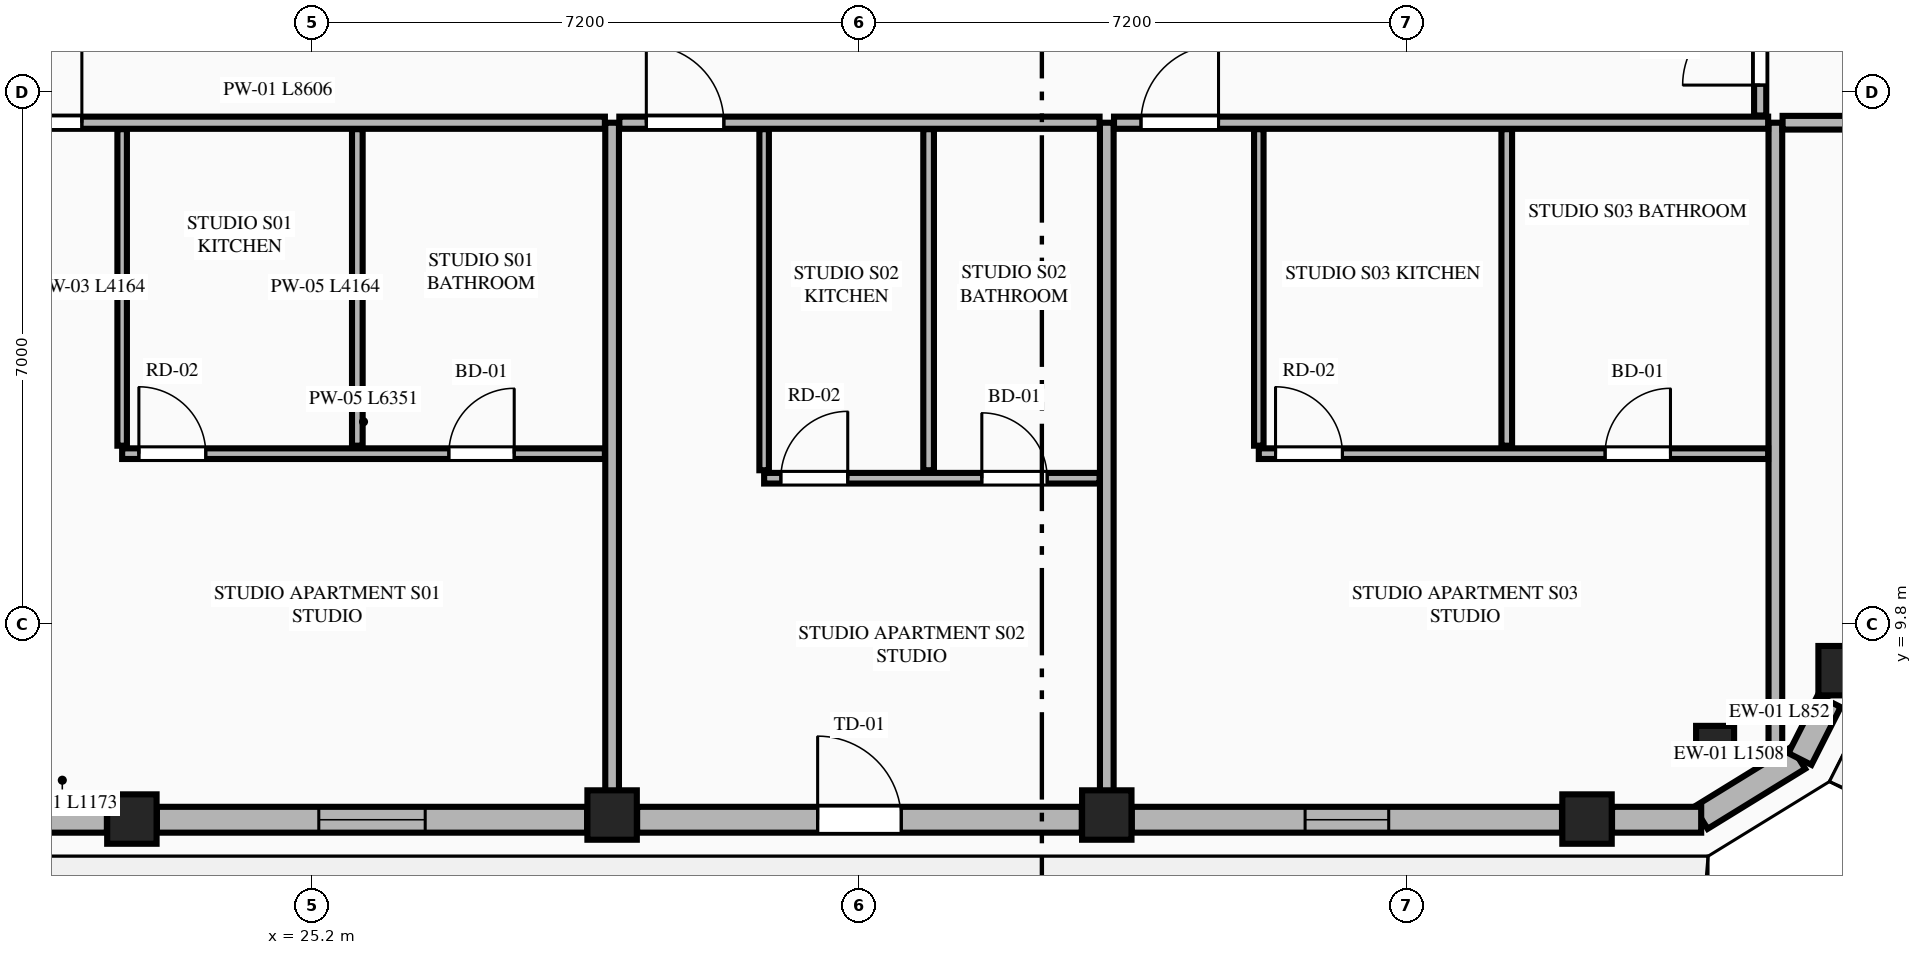
"""IFC4 building model, lengths in metres.
Left out: names, types, materials, properties, quantities, classifications, styles, units other than length and angle.
Written with IfcOpenShell. Run it as: python <this file> out.ifc"""

import sys

from ifc_helpers import new_model, si_unit, direction, frame, frame_2d, origin, origin_2d, place, context, subcontext, project, spatial, rectangle, extrude, element, fill, save


model = new_model("IFC4")
c1 = context("Model", 3, precision=1e-05, world=origin(), true_north=direction((0.0, 1.0)))
c2 = subcontext(c1, "Body", "Model", "MODEL_VIEW")
j1 = project(units=[si_unit("LENGTHUNIT", "METRE"), si_unit("PLANEANGLEUNIT", "RADIAN")], contexts=[c1])
p1 = place(None, origin())
s1 = spatial("IfcSite", under=j1, at=p1, CompositionType="ELEMENT")
p2 = place(p1, origin())
s2 = spatial("IfcBuilding", under=s1, at=p2, CompositionType="ELEMENT")
p3 = place(p2, frame((0.0, 0.0, 270.8)))
s3 = spatial("IfcBuildingStorey", under=s2, at=p3, CompositionType="ELEMENT", Elevation=270.8)
for number, where, z_axis, x_axis in (
    (1, (22.828, 7.239, 0.0), (0.0, 0.0, 1.0), (1.0, 0.0, 0.0)),
    (2, (29.146, 7.292, 0.0), (0.0, 0.0, 1.0), (1.0, 0.0, 0.0)),
    (3, (35.654, 7.292, 0.0), (0.0, 0.0, 1.0), (1.0, 0.0, 0.0)),
    (4, (41.972, 7.239, 0.0), (0.0, 0.0, 1.0), (1.0, 0.0, 0.0)),
    (5, (45.341, 9.191, 0.0), (0.0, 0.0, 1.0), (1.0, 0.0, 0.0)),
):
    element("IfcColumn", number, at=place(p3, frame(where, z_axis=z_axis, x_axis=x_axis)), inside=s3, PredefinedType="COLUMN", context=c2, shape_type="SweptSolid", body=[
        extrude(rectangle(XDim=0.65, YDim=0.65, at=origin_2d()), origin(), (0.0, 0.0, 1.0), 3.65),
    ])
p4 = place(p3, frame((43.657, 8.215, 0.0), z_axis=(0.0, 0.0, 1.0), x_axis=(0.865256437757, 0.501329529272, 0.0)))
e6 = element("IfcColumn", 6, at=p4, inside=s3, PredefinedType="PILASTER", context=c2, shape_type="SweptSolid", body=[
    extrude(rectangle(XDim=0.5, YDim=0.35, at=origin_2d()), origin(), (0.0, 0.0, 1.0), 3.65),
])
p5 = place(p3, frame((43.469, 7.255, 0.0), z_axis=(0.0, 0.0, 1.0), x_axis=(0.851680557619, 0.52406128246, 0.0)))
e7 = element("IfcWall", 7, at=p5, inside=s3, PredefinedType="STANDARD", context=c2, shape_type="SweptSolid", body=[
    extrude(rectangle(XDim=1.508, YDim=0.34, at=frame_2d((0.754, 0.0))), origin(), (0.0, 0.0, 1.0), 3.45),
])
p6 = place(p3, frame((21.326, 7.23, 0.0), z_axis=(0.0, 0.0, 1.0), x_axis=(1.0, 0.0, 0.0)))
e8 = element("IfcWall", 8, at=p6, inside=s3, PredefinedType="STANDARD", context=c2, shape_type="SweptSolid", body=[
    extrude(rectangle(XDim=1.173, YDim=0.34, at=frame_2d((0.586, 0.0))), origin(), (0.0, 0.0, 1.0), 3.45),
])
p7 = place(p3, frame((23.157, 7.23, 0.0), z_axis=(0.0, 0.0, 1.0), x_axis=(1.0, 0.0, 0.0)))
e9 = element("IfcWall", 9, at=p7, inside=s3, PredefinedType="STANDARD", context=c2, shape_type="SweptSolid", body=[
    extrude(rectangle(XDim=5.66, YDim=0.34, at=frame_2d((2.83, 0.0))), origin(), (0.0, 0.0, 1.0), 2.983),
])
p8 = place(p7, frame((2.13, 0.0, 0.75)))
e10 = element("IfcOpeningElement", 10, at=p8, cuts=e9, PredefinedType="OPENING", context=c2, shape_type="SweptSolid", body=[
    extrude(rectangle(XDim=1.4, YDim=2.05, at=frame_2d((0.7, 1.025))), frame((0.0, 0.18, 0.0), z_axis=(0.0, -1.0, 0.0), x_axis=(1.0, 0.0, 0.0)), (0.0, 0.0, 1.0), 0.36),
])
p9 = place(p3, frame((29.475, 7.23, 0.0), z_axis=(0.0, 0.0, 1.0), x_axis=(1.0, 0.0, 0.0)))
e11 = element("IfcWall", 11, at=p9, inside=s3, PredefinedType="STANDARD", context=c2, shape_type="SweptSolid", body=[
    extrude(rectangle(XDim=5.85, YDim=0.34, at=frame_2d((2.925, 0.0))), origin(), (0.0, 0.0, 1.0), 2.983),
])
p10 = place(p9, frame((2.375, 0.0, 0.0)))
e12 = element("IfcOpeningElement", 12, at=p10, cuts=e11, PredefinedType="OPENING", context=c2, shape_type="SweptSolid", body=[
    extrude(rectangle(XDim=1.1, YDim=2.25, at=frame_2d((0.55, 1.125))), frame((0.0, 0.18, 0.0), z_axis=(0.0, -1.0, 0.0), x_axis=(1.0, 0.0, 0.0)), (0.0, 0.0, 1.0), 0.36),
])
p11 = place(p3, frame((35.983, 7.23, 0.0), z_axis=(0.0, 0.0, 1.0), x_axis=(1.0, 0.0, 0.0)))
e13 = element("IfcWall", 13, at=p11, inside=s3, PredefinedType="STANDARD", context=c2, shape_type="SweptSolid", body=[
    extrude(rectangle(XDim=5.66, YDim=0.34, at=frame_2d((2.83, 0.0))), origin(), (0.0, 0.0, 1.0), 2.983),
])
p12 = place(p11, frame((2.28, 0.0, 0.75)))
e14 = element("IfcOpeningElement", 14, at=p12, cuts=e13, PredefinedType="OPENING", context=c2, shape_type="SweptSolid", body=[
    extrude(rectangle(XDim=1.1, YDim=2.0, at=frame_2d((0.55, 1.0))), frame((0.0, 0.18, 0.0), z_axis=(0.0, -1.0, 0.0), x_axis=(1.0, 0.0, 0.0)), (0.0, 0.0, 1.0), 0.36),
])
p13 = place(p3, frame((42.301, 7.23, 0.0), z_axis=(0.0, 0.0, 1.0), x_axis=(1.0, 0.0, 0.0)))
e15 = element("IfcWall", 15, at=p13, inside=s3, PredefinedType="STANDARD", context=c2, shape_type="SweptSolid", body=[
    extrude(rectangle(XDim=1.173, YDim=0.34, at=frame_2d((0.586, 0.0))), origin(), (0.0, 0.0, 1.0), 3.45),
])
p14 = place(p3, frame((44.773, 8.029, 0.0), z_axis=(0.0, 0.0, 1.0), x_axis=(0.451907025977, 0.8920650424, 0.0)))
e16 = element("IfcWall", 16, at=p14, inside=s3, PredefinedType="STANDARD", context=c2, shape_type="SweptSolid", body=[
    extrude(rectangle(XDim=0.852, YDim=0.34, at=frame_2d((0.426, 0.0))), origin(), (0.0, 0.0, 1.0), 3.45),
])
for number, where, z_axis, x_axis in (
    (17, (29.146, 7.405, 0.0), (0.0, 0.0, 1.0), (0.0, 1.0, 0.0)),
    (18, (35.654, 7.405, 0.0), (0.0, 0.0, 1.0), (0.0, 1.0, 0.0)),
):
    element("IfcWall", number, at=place(p3, frame(where, z_axis=z_axis, x_axis=x_axis)), inside=s3, PredefinedType="PARTITIONING", context=c2, shape_type="SweptSolid", body=[
        extrude(rectangle(XDim=8.995, YDim=0.18, at=frame_2d((4.498, 0.0))), origin(), (0.0, 0.0, 1.0), 2.907),
    ])
p15 = place(p3, frame((44.45, 8.119, 0.0), z_axis=(0.0, 0.0, 1.0), x_axis=(0.0, 1.0, 0.0)))
e19 = element("IfcWall", 19, at=p15, inside=s3, PredefinedType="PARTITIONING", context=c2, shape_type="SweptSolid", body=[
    extrude(rectangle(XDim=8.281, YDim=0.18, at=frame_2d((4.141, 0.0))), origin(), (0.0, 0.0, 1.0), 3.45),
])
p16 = place(p3, frame((20.445, 16.4, 0.0), z_axis=(0.0, 0.0, 1.0), x_axis=(1.0, 0.0, 0.0)))
e20 = element("IfcWall", 20, at=p16, inside=s3, PredefinedType="PARTITIONING", context=c2, shape_type="SweptSolid", body=[
    extrude(rectangle(XDim=8.606, YDim=0.16, at=frame_2d((4.303, 0.0))), origin(), (0.0, 0.0, 1.0), 3.45),
])
p17 = place(p16, frame((0.705, 0.0, 0.0)))
e21 = element("IfcOpeningElement", 21, at=p17, cuts=e20, PredefinedType="OPENING", context=c2, shape_type="SweptSolid", body=[
    extrude(rectangle(XDim=1.02, YDim=2.25, at=frame_2d((0.51, 1.125))), frame((0.0, 0.09, 0.0), z_axis=(0.0, -1.0, 0.0), x_axis=(1.0, 0.0, 0.0)), (0.0, 0.0, 1.0), 0.18),
])
p18 = place(p3, frame((22.7, 12.151, 0.0), z_axis=(0.0, 0.0, 1.0), x_axis=(0.0, 1.0, 0.0)))
e22 = element("IfcWall", 22, at=p18, inside=s3, PredefinedType="PARTITIONING", context=c2, shape_type="SweptSolid", body=[
    extrude(rectangle(XDim=4.164, YDim=0.125, at=frame_2d((2.082, 0.0))), origin(), (0.0, 0.0, 1.0), 2.907),
])
p19 = place(p3, frame((22.7, 12.046, 0.0), z_axis=(0.0, 0.0, 1.0), x_axis=(1.0, 0.0, 0.0)))
e23 = element("IfcWall", 23, at=p19, inside=s3, PredefinedType="PLUMBINGWALL", context=c2, shape_type="SweptSolid", body=[
    extrude(rectangle(XDim=6.351, YDim=0.14, at=frame_2d((3.176, 0.0))), origin(), (0.0, 0.0, 1.0), 3.45),
])
p20 = place(p19, frame((4.298, 0.0, 0.0)))
e24 = element("IfcOpeningElement", 24, at=p20, cuts=e23, PredefinedType="OPENING", context=c2, shape_type="SweptSolid", body=[
    extrude(rectangle(XDim=0.86, YDim=2.1, at=frame_2d((0.43, 1.05))), frame((0.0, 0.08, 0.0), z_axis=(0.0, -1.0, 0.0), x_axis=(1.0, 0.0, 0.0)), (0.0, 0.0, 1.0), 0.16),
])
p21 = place(p19, frame((0.22, 0.0, 0.0)))
e25 = element("IfcOpeningElement", 25, at=p21, cuts=e23, PredefinedType="OPENING", context=c2, shape_type="SweptSolid", body=[
    extrude(rectangle(XDim=0.88, YDim=2.15, at=frame_2d((0.44, 1.075))), frame((0.0, 0.08, 0.0), z_axis=(0.0, -1.0, 0.0), x_axis=(1.0, 0.0, 0.0)), (0.0, 0.0, 1.0), 0.16),
])
p22 = place(p3, frame((25.794, 12.151, 0.0), z_axis=(0.0, 0.0, 1.0), x_axis=(0.0, 1.0, 0.0)))
e26 = element("IfcWall", 26, at=p22, inside=s3, PredefinedType="PLUMBINGWALL", context=c2, shape_type="SweptSolid", body=[
    extrude(rectangle(XDim=4.164, YDim=0.14, at=frame_2d((2.082, 0.0))), origin(), (0.0, 0.0, 1.0), 3.45),
])
p23 = place(p3, frame((29.241, 16.4, 0.0), z_axis=(0.0, 0.0, 1.0), x_axis=(1.0, 0.0, 0.0)))
e27 = element("IfcWall", 27, at=p23, inside=s3, PredefinedType="PARTITIONING", context=c2, shape_type="SweptSolid", body=[
    extrude(rectangle(XDim=6.318, YDim=0.16, at=frame_2d((3.159, 0.0))), origin(), (0.0, 0.0, 1.0), 3.45),
])
p24 = place(p23, frame((0.355, 0.0, 0.0)))
e28 = element("IfcOpeningElement", 28, at=p24, cuts=e27, PredefinedType="OPENING", context=c2, shape_type="SweptSolid", body=[
    extrude(rectangle(XDim=1.02, YDim=2.25, at=frame_2d((0.51, 1.125))), frame((0.0, 0.09, 0.0), z_axis=(0.0, -1.0, 0.0), x_axis=(1.0, 0.0, 0.0)), (0.0, 0.0, 1.0), 0.18),
])
p25 = place(p3, frame((31.146, 11.828, 0.0), z_axis=(0.0, 0.0, 1.0), x_axis=(0.0, 1.0, 0.0)))
e29 = element("IfcWall", 29, at=p25, inside=s3, PredefinedType="PARTITIONING", context=c2, shape_type="SweptSolid", body=[
    extrude(rectangle(XDim=4.487, YDim=0.125, at=frame_2d((2.244, 0.0))), origin(), (0.0, 0.0, 1.0), 3.45),
])
p26 = place(p3, frame((31.146, 11.723, 0.0), z_axis=(0.0, 0.0, 1.0), x_axis=(1.0, 0.0, 0.0)))
e30 = element("IfcWall", 30, at=p26, inside=s3, PredefinedType="PLUMBINGWALL", context=c2, shape_type="SweptSolid", body=[
    extrude(rectangle(XDim=4.413, YDim=0.14, at=frame_2d((2.207, 0.0))), origin(), (0.0, 0.0, 1.0), 3.45),
])
p27 = place(p26, frame((2.864, 0.0, 0.0)))
e31 = element("IfcOpeningElement", 31, at=p27, cuts=e30, PredefinedType="OPENING", context=c2, shape_type="SweptSolid", body=[
    extrude(rectangle(XDim=0.86, YDim=2.1, at=frame_2d((0.43, 1.05))), frame((0.0, 0.08, 0.0), z_axis=(0.0, -1.0, 0.0), x_axis=(1.0, 0.0, 0.0)), (0.0, 0.0, 1.0), 0.16),
])
p28 = place(p26, frame((0.22, 0.0, 0.0)))
e32 = element("IfcOpeningElement", 32, at=p28, cuts=e30, PredefinedType="OPENING", context=c2, shape_type="SweptSolid", body=[
    extrude(rectangle(XDim=0.88, YDim=2.15, at=frame_2d((0.44, 1.075))), frame((0.0, 0.08, 0.0), z_axis=(0.0, -1.0, 0.0), x_axis=(1.0, 0.0, 0.0)), (0.0, 0.0, 1.0), 0.16),
])
p29 = place(p3, frame((33.31, 11.828, 0.0), z_axis=(0.0, 0.0, 1.0), x_axis=(0.0, 1.0, 0.0)))
e33 = element("IfcWall", 33, at=p29, inside=s3, PredefinedType="PLUMBINGWALL", context=c2, shape_type="SweptSolid", body=[
    extrude(rectangle(XDim=4.487, YDim=0.14, at=frame_2d((2.244, 0.0))), origin(), (0.0, 0.0, 1.0), 3.45),
])
p30 = place(p3, frame((35.749, 16.4, 0.0), z_axis=(0.0, 0.0, 1.0), x_axis=(1.0, 0.0, 0.0)))
e34 = element("IfcWall", 34, at=p30, inside=s3, PredefinedType="PARTITIONING", context=c2, shape_type="SweptSolid", body=[
    extrude(rectangle(XDim=8.606, YDim=0.16, at=frame_2d((4.303, 0.0))), origin(), (0.0, 0.0, 1.0), 3.45),
])
p31 = place(p30, frame((0.355, 0.0, 0.0)))
e35 = element("IfcOpeningElement", 35, at=p31, cuts=e34, PredefinedType="OPENING", context=c2, shape_type="SweptSolid", body=[
    extrude(rectangle(XDim=1.02, YDim=2.25, at=frame_2d((0.51, 1.125))), frame((0.0, 0.09, 0.0), z_axis=(0.0, -1.0, 0.0), x_axis=(1.0, 0.0, 0.0)), (0.0, 0.0, 1.0), 0.18),
])
p32 = place(p3, frame((37.654, 12.151, 0.0), z_axis=(0.0, 0.0, 1.0), x_axis=(0.0, 1.0, 0.0)))
e36 = element("IfcWall", 36, at=p32, inside=s3, PredefinedType="PARTITIONING", context=c2, shape_type="SweptSolid", body=[
    extrude(rectangle(XDim=4.164, YDim=0.125, at=frame_2d((2.082, 0.0))), origin(), (0.0, 0.0, 1.0), 3.45),
])
p33 = place(p3, frame((37.654, 12.046, 0.0), z_axis=(0.0, 0.0, 1.0), x_axis=(1.0, 0.0, 0.0)))
e37 = element("IfcWall", 37, at=p33, inside=s3, PredefinedType="PLUMBINGWALL", context=c2, shape_type="SweptSolid", body=[
    extrude(rectangle(XDim=6.701, YDim=0.14, at=frame_2d((3.351, 0.0))), origin(), (0.0, 0.0, 1.0), 3.45),
])
p34 = place(p33, frame((4.556, 0.0, 0.0)))
e38 = element("IfcOpeningElement", 38, at=p34, cuts=e37, PredefinedType="OPENING", context=c2, shape_type="SweptSolid", body=[
    extrude(rectangle(XDim=0.86, YDim=2.1, at=frame_2d((0.43, 1.05))), frame((0.0, 0.08, 0.0), z_axis=(0.0, -1.0, 0.0), x_axis=(1.0, 0.0, 0.0)), (0.0, 0.0, 1.0), 0.16),
])
p35 = place(p33, frame((0.22, 0.0, 0.0)))
e39 = element("IfcOpeningElement", 39, at=p35, cuts=e37, PredefinedType="OPENING", context=c2, shape_type="SweptSolid", body=[
    extrude(rectangle(XDim=0.88, YDim=2.15, at=frame_2d((0.44, 1.075))), frame((0.0, 0.08, 0.0), z_axis=(0.0, -1.0, 0.0), x_axis=(1.0, 0.0, 0.0)), (0.0, 0.0, 1.0), 0.16),
])
p36 = place(p3, frame((40.916, 12.151, 0.0), z_axis=(0.0, 0.0, 1.0), x_axis=(0.0, 1.0, 0.0)))
e40 = element("IfcWall", 40, at=p36, inside=s3, PredefinedType="PLUMBINGWALL", context=c2, shape_type="SweptSolid", body=[
    extrude(rectangle(XDim=4.164, YDim=0.14, at=frame_2d((2.082, 0.0))), origin(), (0.0, 0.0, 1.0), 3.45),
])
p37 = place(p3, frame((44.545, 16.4, 0.0), z_axis=(0.0, 0.0, 1.0), x_axis=(1.0, 0.0, 0.0)))
e41 = element("IfcWall", 41, at=p37, inside=s3, PredefinedType="PARTITIONING", context=c2, shape_type="SweptSolid", body=[
    extrude(rectangle(XDim=4.221, YDim=0.18, at=frame_2d((2.111, 0.0))), origin(), (0.0, 0.0, 1.0), 3.45),
])
p38 = place(p3, frame((44.25, 16.495, 0.0), z_axis=(0.0, 0.0, 1.0), x_axis=(0.0, 1.0, 0.0)))
e42 = element("IfcWall", 42, at=p38, inside=s3, PredefinedType="PARTITIONING", context=c2, shape_type="SweptSolid", body=[
    extrude(rectangle(XDim=18.41, YDim=0.16, at=frame_2d((9.205, 0.0))), origin(), (0.0, 0.0, 1.0), 3.137),
])
p39 = place(p38, frame((0.4, 0.0, 0.0)))
e43 = element("IfcOpeningElement", 43, at=p39, cuts=e42, PredefinedType="OPENING", context=c2, shape_type="SweptSolid", body=[
    extrude(rectangle(XDim=1.02, YDim=2.25, at=frame_2d((0.51, 1.125))), frame((0.0, 0.09, 0.0), z_axis=(0.0, -1.0, 0.0), x_axis=(1.0, 0.0, 0.0)), (0.0, 0.0, 1.0), 0.18),
])
p40 = place(p8, origin())
e44 = element("IfcWindow", 44, at=p40, inside=s3, PartitioningType="SINGLE_PANEL", PredefinedType="WINDOW", context=c2, shape_type="SweptSolid", body=[
    extrude(rectangle(XDim=1.4, YDim=2.05, at=frame_2d((0.7, 1.025))), frame((0.0, 0.03, 0.0), z_axis=(0.0, -1.0, 0.0), x_axis=(1.0, 0.0, 0.0)), (0.0, 0.0, 1.0), 0.06),
])
fill(e10, e44)
p41 = place(p10, origin())
e45 = element("IfcDoor", 45, at=p41, inside=s3, OperationType="SINGLE_SWING_LEFT", PredefinedType="DOOR", context=c2, shape_type="SweptSolid", body=[
    extrude(rectangle(XDim=1.1, YDim=2.25, at=frame_2d((0.55, 1.125))), frame((0.0, 0.025, 0.0), z_axis=(0.0, -1.0, 0.0), x_axis=(1.0, 0.0, 0.0)), (0.0, 0.0, 1.0), 0.05),
])
fill(e12, e45)
p42 = place(p12, origin())
e46 = element("IfcWindow", 46, at=p42, inside=s3, PartitioningType="SINGLE_PANEL", PredefinedType="WINDOW", context=c2, shape_type="SweptSolid", body=[
    extrude(rectangle(XDim=1.1, YDim=2.0, at=frame_2d((0.55, 1.0))), frame((0.0, 0.03, 0.0), z_axis=(0.0, -1.0, 0.0), x_axis=(1.0, 0.0, 0.0)), (0.0, 0.0, 1.0), 0.06),
])
fill(e14, e46)
p43 = place(p20, origin())
e47 = element("IfcDoor", 47, at=p43, inside=s3, OperationType="SINGLE_SWING_RIGHT", PredefinedType="DOOR", context=c2, shape_type="SweptSolid", body=[
    extrude(rectangle(XDim=0.86, YDim=2.1, at=frame_2d((0.43, 1.05))), frame((0.0, 0.025, 0.0), z_axis=(0.0, -1.0, 0.0), x_axis=(1.0, 0.0, 0.0)), (0.0, 0.0, 1.0), 0.05),
])
fill(e24, e47)
p44 = place(p17, origin())
e48 = element("IfcDoor", 48, at=p44, inside=s3, OperationType="SINGLE_SWING_RIGHT", PredefinedType="DOOR", context=c2, shape_type="SweptSolid", body=[
    extrude(rectangle(XDim=1.02, YDim=2.25, at=frame_2d((0.51, 1.125))), frame((0.0, 0.025, 0.0), z_axis=(0.0, -1.0, 0.0), x_axis=(1.0, 0.0, 0.0)), (0.0, 0.0, 1.0), 0.05),
])
fill(e21, e48)
p45 = place(p21, origin())
e49 = element("IfcDoor", 49, at=p45, inside=s3, OperationType="SINGLE_SWING_LEFT", PredefinedType="DOOR", context=c2, shape_type="SweptSolid", body=[
    extrude(rectangle(XDim=0.88, YDim=2.15, at=frame_2d((0.44, 1.075))), frame((0.0, 0.025, 0.0), z_axis=(0.0, -1.0, 0.0), x_axis=(1.0, 0.0, 0.0)), (0.0, 0.0, 1.0), 0.05),
])
fill(e25, e49)
p46 = place(p27, origin())
e50 = element("IfcDoor", 50, at=p46, inside=s3, OperationType="SINGLE_SWING_LEFT", PredefinedType="DOOR", context=c2, shape_type="SweptSolid", body=[
    extrude(rectangle(XDim=0.86, YDim=2.1, at=frame_2d((0.43, 1.05))), frame((0.0, 0.025, 0.0), z_axis=(0.0, -1.0, 0.0), x_axis=(1.0, 0.0, 0.0)), (0.0, 0.0, 1.0), 0.05),
])
fill(e31, e50)
p47 = place(p24, origin())
e51 = element("IfcDoor", 51, at=p47, inside=s3, OperationType="SINGLE_SWING_LEFT", PredefinedType="DOOR", context=c2, shape_type="SweptSolid", body=[
    extrude(rectangle(XDim=1.02, YDim=2.25, at=frame_2d((0.51, 1.125))), frame((0.0, 0.025, 0.0), z_axis=(0.0, -1.0, 0.0), x_axis=(1.0, 0.0, 0.0)), (0.0, 0.0, 1.0), 0.05),
])
fill(e28, e51)
p48 = place(p28, origin())
e52 = element("IfcDoor", 52, at=p48, inside=s3, OperationType="SINGLE_SWING_RIGHT", PredefinedType="DOOR", context=c2, shape_type="SweptSolid", body=[
    extrude(rectangle(XDim=0.88, YDim=2.15, at=frame_2d((0.44, 1.075))), frame((0.0, 0.025, 0.0), z_axis=(0.0, -1.0, 0.0), x_axis=(1.0, 0.0, 0.0)), (0.0, 0.0, 1.0), 0.05),
])
fill(e32, e52)
p49 = place(p34, origin())
e53 = element("IfcDoor", 53, at=p49, inside=s3, OperationType="SINGLE_SWING_RIGHT", PredefinedType="DOOR", context=c2, shape_type="SweptSolid", body=[
    extrude(rectangle(XDim=0.86, YDim=2.1, at=frame_2d((0.43, 1.05))), frame((0.0, 0.025, 0.0), z_axis=(0.0, -1.0, 0.0), x_axis=(1.0, 0.0, 0.0)), (0.0, 0.0, 1.0), 0.05),
])
fill(e38, e53)
p50 = place(p31, origin())
e54 = element("IfcDoor", 54, at=p50, inside=s3, OperationType="SINGLE_SWING_RIGHT", PredefinedType="DOOR", context=c2, shape_type="SweptSolid", body=[
    extrude(rectangle(XDim=1.02, YDim=2.25, at=frame_2d((0.51, 1.125))), frame((0.0, 0.025, 0.0), z_axis=(0.0, -1.0, 0.0), x_axis=(1.0, 0.0, 0.0)), (0.0, 0.0, 1.0), 0.05),
])
fill(e35, e54)
p51 = place(p35, origin())
e55 = element("IfcDoor", 55, at=p51, inside=s3, OperationType="SINGLE_SWING_LEFT", PredefinedType="DOOR", context=c2, shape_type="SweptSolid", body=[
    extrude(rectangle(XDim=0.88, YDim=2.15, at=frame_2d((0.44, 1.075))), frame((0.0, 0.025, 0.0), z_axis=(0.0, -1.0, 0.0), x_axis=(1.0, 0.0, 0.0)), (0.0, 0.0, 1.0), 0.05),
])
fill(e39, e55)
p52 = place(p39, origin())
e56 = element("IfcDoor", 56, at=p52, inside=s3, OperationType="SINGLE_SWING_LEFT", PredefinedType="DOOR", context=c2, shape_type="SweptSolid", body=[
    extrude(rectangle(XDim=1.02, YDim=2.25, at=frame_2d((0.51, 1.125))), frame((0.0, 0.025, 0.0), z_axis=(0.0, -1.0, 0.0), x_axis=(1.0, 0.0, 0.0)), (0.0, 0.0, 1.0), 0.05),
])
fill(e43, e56)
save(model, sys.argv[1])
